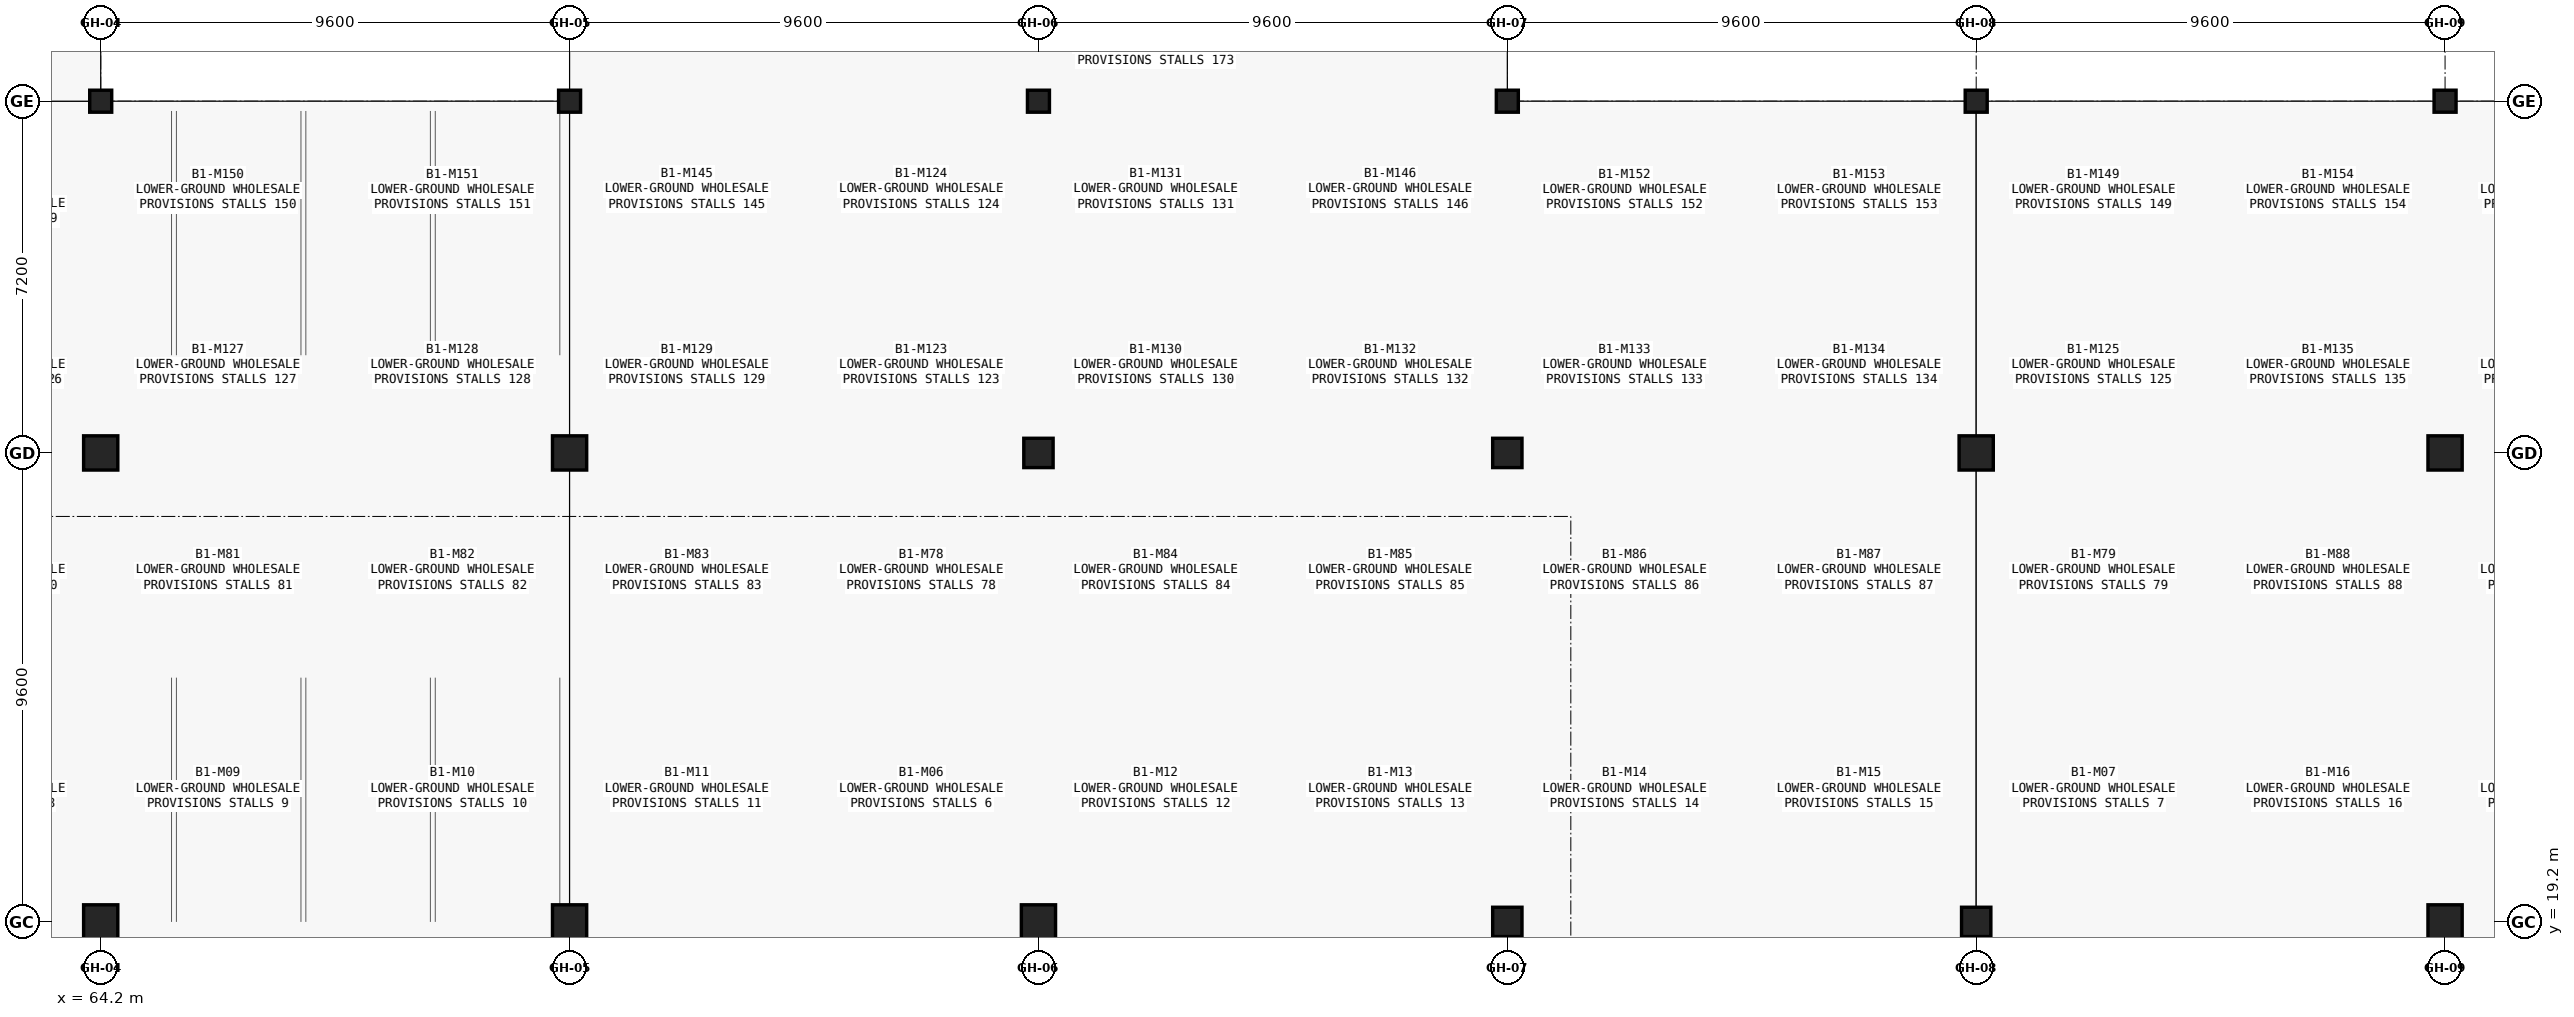
"""IFC4 building model, lengths in metres.
Left out: names, types, materials, properties, quantities, classifications, styles, units other than length and angle.
Written with IfcOpenShell. Run it as: python <this file> out.ifc"""

import sys

from ifc_helpers import new_model, si_unit, direction, frame, origin, origin_2d, place, context, subcontext, project, spatial, rectangle, circle, i_section, extrude, element, save


model = new_model("IFC4")
c1 = context("Model", 3, precision=1e-05, world=origin(), true_north=direction((0.0, 1.0)))
c2 = subcontext(c1, "Body", "Model", "MODEL_VIEW")
j1 = project(units=[si_unit("LENGTHUNIT", "METRE"), si_unit("PLANEANGLEUNIT", "RADIAN")], contexts=[c1])
p1 = place(None, origin())
s1 = spatial("IfcSite", under=j1, at=p1, CompositionType="ELEMENT")
p2 = place(p1, origin())
s2 = spatial("IfcBuilding", under=s1, at=p2, CompositionType="ELEMENT")
p3 = place(p2, frame((0.0, 0.0, -5.4)))
s3 = spatial("IfcBuildingStorey", under=s2, at=p3, CompositionType="ELEMENT", Elevation=-5.4)
for number, where, z_axis, x_axis in (
    (1, (64.2, 19.2, 0.0), (0.0, 0.0, 1.0), (1.0, 0.0, 0.0)),
    (2, (64.2, 28.8, 0.0), (0.0, 0.0, 1.0), (1.0, 0.0, 0.0)),
):
    element("IfcColumn", number, at=place(p3, frame(where, z_axis=z_axis, x_axis=x_axis)), inside=s3, PredefinedType="COLUMN", context=c2, shape_type="SweptSolid", body=[
        extrude(circle(Radius=0.35, at=origin_2d()), origin(), (0.0, 0.0, 1.0), 5.4),
    ])
p4 = place(p3, frame((64.2, 36.0, 0.0), z_axis=(0.0, 0.0, 1.0), x_axis=(1.0, 0.0, 0.0)))
e3 = element("IfcColumn", 3, at=p4, inside=s3, PredefinedType="COLUMN", context=c2, shape_type="SweptSolid", body=[
    extrude(i_section(OverallWidth=0.45, OverallDepth=0.45, WebThickness=0.014, FlangeThickness=0.024, FilletRadius=0.024, at=origin_2d()), origin(), (0.0, 0.0, 1.0), 5.4),
])
for number, where, z_axis, x_axis in (
    (4, (73.8, 19.2, 0.0), (0.0, 0.0, 1.0), (1.0, 0.0, 0.0)),
    (5, (73.8, 28.8, 0.0), (0.0, 0.0, 1.0), (1.0, 0.0, 0.0)),
):
    element("IfcColumn", number, at=place(p3, frame(where, z_axis=z_axis, x_axis=x_axis)), inside=s3, PredefinedType="COLUMN", context=c2, shape_type="SweptSolid", body=[
        extrude(circle(Radius=0.35, at=origin_2d()), origin(), (0.0, 0.0, 1.0), 5.4),
    ])
p5 = place(p3, frame((73.8, 36.0, 0.0), z_axis=(0.0, 0.0, 1.0), x_axis=(1.0, 0.0, 0.0)))
e6 = element("IfcColumn", 6, at=p5, inside=s3, PredefinedType="COLUMN", context=c2, shape_type="SweptSolid", body=[
    extrude(i_section(OverallWidth=0.45, OverallDepth=0.45, WebThickness=0.014, FlangeThickness=0.024, FilletRadius=0.024, at=origin_2d()), origin(), (0.0, 0.0, 1.0), 5.4),
])
p6 = place(p3, frame((83.4, 19.2, 0.0), z_axis=(0.0, 0.0, 1.0), x_axis=(1.0, 0.0, 0.0)))
e7 = element("IfcColumn", 7, at=p6, inside=s3, PredefinedType="COLUMN", context=c2, shape_type="SweptSolid", body=[
    extrude(circle(Radius=0.35, at=origin_2d()), origin(), (0.0, 0.0, 1.0), 5.4),
])
p7 = place(p3, frame((83.4, 28.8, 0.0), z_axis=(0.0, 0.0, 1.0), x_axis=(1.0, 0.0, 0.0)))
e8 = element("IfcColumn", 8, at=p7, inside=s3, PredefinedType="COLUMN", context=c2, shape_type="SweptSolid", body=[
    extrude(rectangle(XDim=0.6, YDim=0.6, at=origin_2d()), origin(), (0.0, 0.0, 1.0), 5.4),
])
p8 = place(p3, frame((83.4, 36.0, 0.0), z_axis=(0.0, 0.0, 1.0), x_axis=(1.0, 0.0, 0.0)))
e9 = element("IfcColumn", 9, at=p8, inside=s3, PredefinedType="COLUMN", context=c2, shape_type="SweptSolid", body=[
    extrude(i_section(OverallWidth=0.45, OverallDepth=0.45, WebThickness=0.014, FlangeThickness=0.024, FilletRadius=0.024, at=origin_2d()), origin(), (0.0, 0.0, 1.0), 5.4),
])
for number, where, z_axis, x_axis in (
    (10, (93.0, 19.2, 0.0), (0.0, 0.0, 1.0), (1.0, 0.0, 0.0)),
    (11, (93.0, 28.8, 0.0), (0.0, 0.0, 1.0), (1.0, 0.0, 0.0)),
):
    element("IfcColumn", number, at=place(p3, frame(where, z_axis=z_axis, x_axis=x_axis)), inside=s3, PredefinedType="COLUMN", context=c2, shape_type="SweptSolid", body=[
        extrude(rectangle(XDim=0.6, YDim=0.6, at=origin_2d()), origin(), (0.0, 0.0, 1.0), 5.4),
    ])
p9 = place(p3, frame((93.0, 36.0, 0.0), z_axis=(0.0, 0.0, 1.0), x_axis=(1.0, 0.0, 0.0)))
e12 = element("IfcColumn", 12, at=p9, inside=s3, PredefinedType="COLUMN", context=c2, shape_type="SweptSolid", body=[
    extrude(i_section(OverallWidth=0.45, OverallDepth=0.45, WebThickness=0.014, FlangeThickness=0.024, FilletRadius=0.024, at=origin_2d()), origin(), (0.0, 0.0, 1.0), 5.4),
])
p10 = place(p3, frame((102.6, 19.2, 0.0), z_axis=(0.0, 0.0, 1.0), x_axis=(1.0, 0.0, 0.0)))
e13 = element("IfcColumn", 13, at=p10, inside=s3, PredefinedType="COLUMN", context=c2, shape_type="SweptSolid", body=[
    extrude(rectangle(XDim=0.6, YDim=0.6, at=origin_2d()), origin(), (0.0, 0.0, 1.0), 5.4),
])
p11 = place(p3, frame((102.6, 28.8, 0.0), z_axis=(0.0, 0.0, 1.0), x_axis=(1.0, 0.0, 0.0)))
e14 = element("IfcColumn", 14, at=p11, inside=s3, PredefinedType="COLUMN", context=c2, shape_type="SweptSolid", body=[
    extrude(circle(Radius=0.35, at=origin_2d()), origin(), (0.0, 0.0, 1.0), 5.4),
])
p12 = place(p3, frame((102.6, 36.0, 0.0), z_axis=(0.0, 0.0, 1.0), x_axis=(1.0, 0.0, 0.0)))
e15 = element("IfcColumn", 15, at=p12, inside=s3, PredefinedType="COLUMN", context=c2, shape_type="SweptSolid", body=[
    extrude(i_section(OverallWidth=0.45, OverallDepth=0.45, WebThickness=0.014, FlangeThickness=0.024, FilletRadius=0.024, at=origin_2d()), origin(), (0.0, 0.0, 1.0), 5.4),
])
for number, where, z_axis, x_axis in (
    (16, (112.2, 19.2, 0.0), (0.0, 0.0, 1.0), (1.0, 0.0, 0.0)),
    (17, (112.2, 28.8, 0.0), (0.0, 0.0, 1.0), (1.0, 0.0, 0.0)),
):
    element("IfcColumn", number, at=place(p3, frame(where, z_axis=z_axis, x_axis=x_axis)), inside=s3, PredefinedType="COLUMN", context=c2, shape_type="SweptSolid", body=[
        extrude(circle(Radius=0.35, at=origin_2d()), origin(), (0.0, 0.0, 1.0), 5.4),
    ])
p13 = place(p3, frame((112.2, 36.0, 0.0), z_axis=(0.0, 0.0, 1.0), x_axis=(1.0, 0.0, 0.0)))
e18 = element("IfcColumn", 18, at=p13, inside=s3, PredefinedType="COLUMN", context=c2, shape_type="SweptSolid", body=[
    extrude(i_section(OverallWidth=0.45, OverallDepth=0.45, WebThickness=0.014, FlangeThickness=0.024, FilletRadius=0.024, at=origin_2d()), origin(), (0.0, 0.0, 1.0), 5.4),
])
save(model, sys.argv[1])
